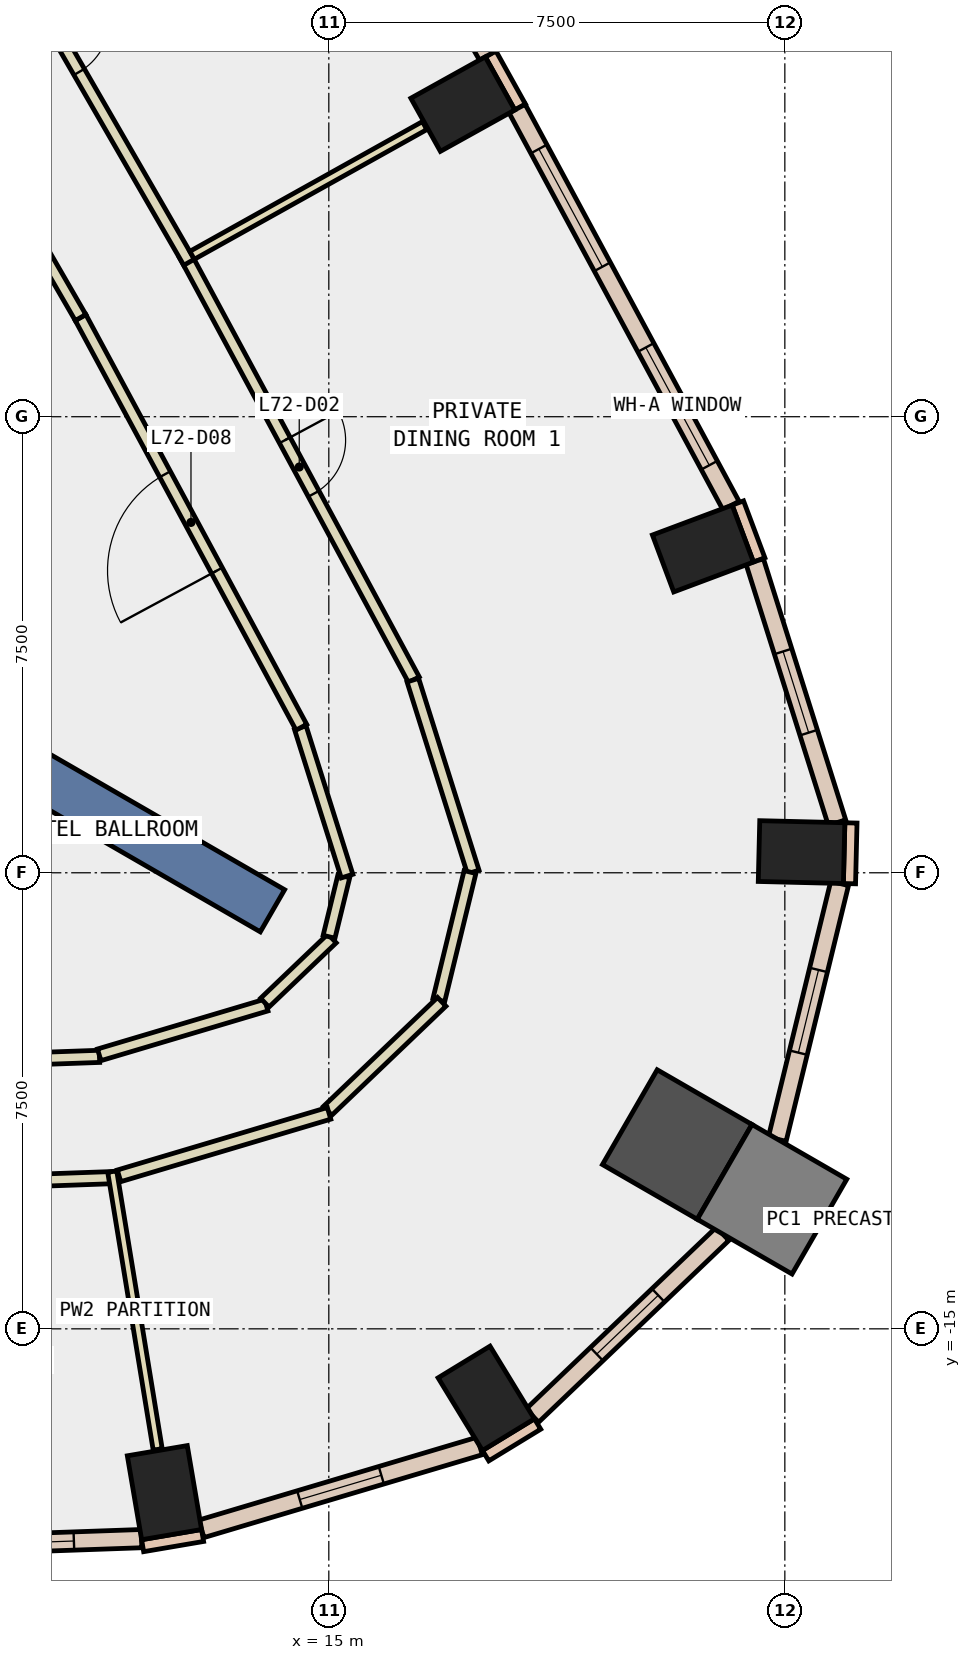
"""IFC4 building model, lengths in metres.
Left out: names, types, materials, properties, quantities, classifications, styles, units other than length and angle.
Written with IfcOpenShell. Run it as: python <this file> out.ifc"""

import sys

from ifc_helpers import new_model, si_unit, direction, frame, frame_2d, origin, origin_2d, place, context, subcontext, project, spatial, rectangle, extrude, element, fill, save


model = new_model("IFC4")
c1 = context("Model", 3, precision=1e-05, world=origin(), true_north=direction((0.0, 1.0)))
c2 = subcontext(c1, "Body", "Model", "MODEL_VIEW")
j1 = project(units=[si_unit("LENGTHUNIT", "METRE"), si_unit("PLANEANGLEUNIT", "RADIAN")], contexts=[c1])
p1 = place(None, origin())
s1 = spatial("IfcSite", under=j1, at=p1, CompositionType="ELEMENT")
p2 = place(p1, origin())
s2 = spatial("IfcBuilding", under=s1, at=p2, CompositionType="ELEMENT")
p3 = place(p2, frame((0.0, 0.0, 308.0)))
s3 = spatial("IfcBuildingStorey", under=s2, at=p3, CompositionType="ELEMENT", Elevation=308.0)
for number, where, z_axis, x_axis in (
    (1, (12.297, -17.694, -0.34), (0.0, 0.0, 1.0), (0.986, 0.168, 0.0)),
    (2, (17.589, -16.143, -0.34), (0.0, 0.0, 1.0), (0.854, 0.521, 0.0)),
):
    element("IfcColumn", number, at=place(p3, frame(where, z_axis=z_axis, x_axis=x_axis)), inside=s3, PredefinedType="COLUMN", context=c2, shape_type="SweptSolid", body=[
        extrude(rectangle(XDim=1.0, YDim=1.4, at=origin_2d()), origin(), (0.0, 0.0, 1.0), 3.6),
    ])
p4 = place(p3, frame((20.73, -11.969, -0.34), z_axis=(0.0, 0.0, 1.0), x_axis=(-0.866025403784, 0.5, 0.0)))
e3 = element("IfcColumn", 3, at=p4, inside=s3, PredefinedType="COLUMN", context=c2, shape_type="SweptSolid", body=[
    extrude(rectangle(XDim=1.8, YDim=1.8, at=origin_2d()), origin(), (0.0, 0.0, 1.0), 3.6),
])
for number, where, z_axis, x_axis in (
    (4, (22.775, -7.16, -0.34), (0.0, 0.0, 1.0), (0.024, 1.0, 0.0)),
    (5, (21.153, -2.168, -0.34), (0.0, 0.0, 1.0), (-0.351, 0.936, 0.0)),
    (6, (17.204, 5.141, -0.34), (0.0, 0.0, 1.0), (-0.486, 0.874, 0.0)),
):
    element("IfcColumn", number, at=place(p3, frame(where, z_axis=z_axis, x_axis=x_axis)), inside=s3, PredefinedType="COLUMN", context=c2, shape_type="SweptSolid", body=[
        extrude(rectangle(XDim=1.0, YDim=1.4, at=origin_2d()), origin(), (0.0, 0.0, 1.0), 3.6),
    ])
p5 = place(p3, frame((22.289, -12.869, -0.34), z_axis=(0.0, 0.0, 1.0), x_axis=(-0.866025403784, 0.5, 0.0)))
e7 = element("IfcColumn", 7, at=p5, inside=s3, PredefinedType="COLUMN", context=c2, shape_type="SweptSolid", body=[
    extrude(rectangle(XDim=1.8, YDim=1.8, at=origin_2d()), origin(), (0.0, 0.0, 1.0), 3.6),
])
p6 = place(p3, frame((6.279, -3.625, -0.34), z_axis=(0.0, 0.0, 1.0), x_axis=(0.866017533419, -0.500013631625, 0.0)))
e8 = element("IfcWall", 8, at=p6, inside=s3, PredefinedType="SHEAR", context=c2, shape_type="SweptSolid", body=[
    extrude(rectangle(XDim=9.0, YDim=0.8, at=frame_2d((4.5, 0.0))), origin(), (0.0, 0.0, 1.0), 3.6),
])
p7 = place(p3, frame((22.078, -2.355, 0.0), z_axis=(0.0, 0.0, 1.0), x_axis=(-0.350962844851, 0.936389385637, 0.0)))
e9 = element("IfcWall", 9, at=p7, inside=s3, PredefinedType="STANDARD", context=c2, shape_type="SweptSolid", body=[
    extrude(rectangle(XDim=1.0, YDim=0.2, at=frame_2d((0.5, 0.0))), origin(), (0.0, 0.0, 1.0), 3.26),
])
p8 = place(p3, frame((18.147, 5.092, 0.0), z_axis=(0.0, 0.0, 1.0), x_axis=(-0.486036693078, 0.873938403425, 0.0)))
e10 = element("IfcWall", 10, at=p8, inside=s3, PredefinedType="STANDARD", context=c2, shape_type="SweptSolid", body=[
    extrude(rectangle(XDim=1.0, YDim=0.2, at=frame_2d((0.5, 0.0))), origin(), (0.0, 0.0, 1.0), 3.26),
])
p9 = place(p3, frame((11.938, -18.566, 0.0), z_axis=(0.0, 0.0, 1.0), x_axis=(0.985800545746, 0.167920469293, 0.0)))
e11 = element("IfcWall", 11, at=p9, inside=s3, PredefinedType="STANDARD", context=c2, shape_type="SweptSolid", body=[
    extrude(rectangle(XDim=1.0, YDim=0.2, at=frame_2d((0.5, 0.0))), origin(), (0.0, 0.0, 1.0), 3.26),
])
p10 = place(p3, frame((17.579, -17.086, 0.0), z_axis=(0.0, 0.0, 1.0), x_axis=(0.853679739553, 0.520798331677, 0.0)))
e12 = element("IfcWall", 12, at=p10, inside=s3, PredefinedType="STANDARD", context=c2, shape_type="SweptSolid", body=[
    extrude(rectangle(XDim=1.0, YDim=0.2, at=frame_2d((0.5, 0.0))), origin(), (0.0, 0.0, 1.0), 3.26),
])
p11 = place(p3, frame((23.563, -7.679, 0.0), z_axis=(0.0, 0.0, 1.0), x_axis=(0.023942303888, 0.999713341956, 0.0)))
e13 = element("IfcWall", 13, at=p11, inside=s3, PredefinedType="STANDARD", context=c2, shape_type="SweptSolid", body=[
    extrude(rectangle(XDim=0.999, YDim=0.2, at=frame_2d((0.5, 0.0))), origin(), (0.0, 0.0, 1.0), 3.26),
])
p12 = place(p3, frame((8.296, -18.578, 0.0), z_axis=(0.0, 0.0, 1.0), x_axis=(0.999377185233, 0.035287981473, 0.0)))
e14 = element("IfcWall", 14, at=p12, inside=s3, PredefinedType="STANDARD", context=c2, shape_type="SweptSolid", body=[
    extrude(rectangle(XDim=3.625, YDim=0.3, at=frame_2d((1.812, 0.0))), origin(), (0.0, 0.0, 1.0), 3.26),
])
p13 = place(p12, frame((1.113, 0.0, 0.9)))
e15 = element("IfcOpeningElement", 15, at=p13, cuts=e14, PredefinedType="OPENING", context=c2, shape_type="SweptSolid", body=[
    extrude(rectangle(XDim=1.4, YDim=2.0, at=frame_2d((0.7, 1.0))), frame((0.0, 0.16, 0.0), z_axis=(0.0, -1.0, 0.0), x_axis=(1.0, 0.0, 0.0)), (0.0, 0.0, 1.0), 0.32),
])
p14 = place(p3, frame((12.904, -18.289, 0.0), z_axis=(0.0, 0.0, 1.0), x_axis=(0.95841929886, 0.285363711031, 0.0)))
e16 = element("IfcWall", 16, at=p14, inside=s3, PredefinedType="STANDARD", context=c2, shape_type="SweptSolid", body=[
    extrude(rectangle(XDim=4.777, YDim=0.3, at=frame_2d((2.388, 0.0))), origin(), (0.0, 0.0, 1.0), 3.26),
])
p15 = place(p14, frame((1.688, 0.0, 0.9)))
e17 = element("IfcOpeningElement", 17, at=p15, cuts=e16, PredefinedType="OPENING", context=c2, shape_type="SweptSolid", body=[
    extrude(rectangle(XDim=1.4, YDim=2.0, at=frame_2d((0.7, 1.0))), frame((0.0, 0.16, 0.0), z_axis=(0.0, -1.0, 0.0), x_axis=(1.0, 0.0, 0.0)), (0.0, 0.0, 1.0), 0.32),
])
p16 = place(p3, frame((18.347, -16.427, 0.0), z_axis=(0.0, 0.0, 1.0), x_axis=(0.723113419412, 0.690729312152, 0.0)))
e18 = element("IfcWall", 18, at=p16, inside=s3, PredefinedType="STANDARD", context=c2, shape_type="SweptSolid", body=[
    extrude(rectangle(XDim=4.327, YDim=0.3, at=frame_2d((2.164, 0.0))), origin(), (0.0, 0.0, 1.0), 3.26),
])
p17 = place(p16, frame((1.464, 0.0, 0.9)))
e19 = element("IfcOpeningElement", 19, at=p17, cuts=e18, PredefinedType="OPENING", context=c2, shape_type="SweptSolid", body=[
    extrude(rectangle(XDim=1.4, YDim=2.0, at=frame_2d((0.7, 1.0))), frame((0.0, 0.16, 0.0), z_axis=(0.0, -1.0, 0.0), x_axis=(1.0, 0.0, 0.0)), (0.0, 0.0, 1.0), 0.32),
])
p18 = place(p3, frame((22.375, -11.881, 0.0), z_axis=(0.0, 0.0, 1.0), x_axis=(0.236958776561, 0.971519705519, 0.0)))
e20 = element("IfcWall", 20, at=p18, inside=s3, PredefinedType="STANDARD", context=c2, shape_type="SweptSolid", body=[
    extrude(rectangle(XDim=4.329, YDim=0.3, at=frame_2d((2.165, 0.0))), origin(), (0.0, 0.0, 1.0), 3.26),
])
p19 = place(p18, frame((1.465, 0.0, 0.9)))
e21 = element("IfcOpeningElement", 21, at=p19, cuts=e20, PredefinedType="OPENING", context=c2, shape_type="SweptSolid", body=[
    extrude(rectangle(XDim=1.4, YDim=2.0, at=frame_2d((0.7, 1.0))), frame((0.0, 0.16, 0.0), z_axis=(0.0, -1.0, 0.0), x_axis=(1.0, 0.0, 0.0)), (0.0, 0.0, 1.0), 0.32),
])
p20 = place(p3, frame((23.358, -6.675, 0.0), z_axis=(0.0, 0.0, 1.0), x_axis=(-0.300534385574, 0.953770980418, 0.0)))
e22 = element("IfcWall", 22, at=p20, inside=s3, PredefinedType="STANDARD", context=c2, shape_type="SweptSolid", body=[
    extrude(rectangle(XDim=4.502, YDim=0.3, at=frame_2d((2.251, 0.0))), origin(), (0.0, 0.0, 1.0), 3.26),
])
p21 = place(p20, frame((1.551, 0.0, 0.9)))
e23 = element("IfcOpeningElement", 23, at=p21, cuts=e22, PredefinedType="OPENING", context=c2, shape_type="SweptSolid", body=[
    extrude(rectangle(XDim=1.4, YDim=2.0, at=frame_2d((0.7, 1.0))), frame((0.0, 0.16, 0.0), z_axis=(0.0, -1.0, 0.0), x_axis=(1.0, 0.0, 0.0)), (0.0, 0.0, 1.0), 0.32),
])
p22 = place(p3, frame((21.615, -1.462, 0.0), z_axis=(0.0, 0.0, 1.0), x_axis=(-0.474421773145, 0.880297666228, 0.0)))
e24 = element("IfcWall", 24, at=p22, inside=s3, PredefinedType="STANDARD", context=c2, shape_type="SweptSolid", body=[
    extrude(rectangle(XDim=7.416, YDim=0.3, at=frame_2d((3.708, 0.0))), origin(), (0.0, 0.0, 1.0), 3.26),
])
p23 = place(p22, frame((0.754, 0.0, 0.9)))
e25 = element("IfcOpeningElement", 25, at=p23, cuts=e24, PredefinedType="OPENING", context=c2, shape_type="SweptSolid", body=[
    extrude(rectangle(XDim=2.2, YDim=2.0, at=frame_2d((1.1, 1.0))), frame((0.0, 0.16, 0.0), z_axis=(0.0, -1.0, 0.0), x_axis=(1.0, 0.0, 0.0)), (0.0, 0.0, 1.0), 0.32),
])
p24 = place(p22, frame((4.462, 0.0, 0.9)))
e26 = element("IfcOpeningElement", 26, at=p24, cuts=e24, PredefinedType="OPENING", context=c2, shape_type="SweptSolid", body=[
    extrude(rectangle(XDim=2.2, YDim=2.0, at=frame_2d((1.1, 1.0))), frame((0.0, 0.16, 0.0), z_axis=(0.0, -1.0, 0.0), x_axis=(1.0, 0.0, 0.0)), (0.0, 0.0, 1.0), 0.32),
])
p25 = place(p3, frame((17.61, 5.937, 0.0), z_axis=(0.0, 0.0, 1.0), x_axis=(-0.499923391538, 0.866069629183, 0.0)))
e27 = element("IfcWall", 27, at=p25, inside=s3, PredefinedType="STANDARD", context=c2, shape_type="SweptSolid", body=[
    extrude(rectangle(XDim=7.327, YDim=0.3, at=frame_2d((3.664, 0.0))), origin(), (0.0, 0.0, 1.0), 3.26),
])
p26 = place(p25, frame((0.732, 0.0, 0.9)))
e28 = element("IfcOpeningElement", 28, at=p26, cuts=e27, PredefinedType="OPENING", context=c2, shape_type="SweptSolid", body=[
    extrude(rectangle(XDim=2.2, YDim=2.0, at=frame_2d((1.1, 1.0))), frame((0.0, 0.16, 0.0), z_axis=(0.0, -1.0, 0.0), x_axis=(1.0, 0.0, 0.0)), (0.0, 0.0, 1.0), 0.32),
])
p27 = place(p25, frame((4.395, 0.0, 0.9)))
e29 = element("IfcOpeningElement", 29, at=p27, cuts=e27, PredefinedType="OPENING", context=c2, shape_type="SweptSolid", body=[
    extrude(rectangle(XDim=2.2, YDim=2.0, at=frame_2d((1.1, 1.0))), frame((0.0, 0.16, 0.0), z_axis=(0.0, -1.0, 0.0), x_axis=(1.0, 0.0, 0.0)), (0.0, 0.0, 1.0), 0.32),
])
p28 = place(p3, frame((7.9, -10.637, 0.0), z_axis=(0.0, 0.0, 1.0), x_axis=(0.999372900517, 0.035409119054, 0.0)))
e30 = element("IfcWall", 30, at=p28, inside=s3, PredefinedType="PARTITIONING", context=c2, shape_type="SweptSolid", body=[
    extrude(rectangle(XDim=3.33, YDim=0.2, at=frame_2d((1.665, 0.0))), origin(), (0.0, 0.0, 1.0), 3.26),
])
p29 = place(p3, frame((11.224, -10.494, 0.0), z_axis=(0.0, 0.0, 1.0), x_axis=(0.958417413979, 0.285370041492, 0.0)))
e31 = element("IfcWall", 31, at=p29, inside=s3, PredefinedType="PARTITIONING", context=c2, shape_type="SweptSolid", body=[
    extrude(rectangle(XDim=2.866, YDim=0.2, at=frame_2d((1.433, 0.0))), origin(), (0.0, 0.0, 1.0), 3.26),
])
p30 = place(p3, frame((13.947, -9.636, 0.0), z_axis=(0.0, 0.0, 1.0), x_axis=(0.723283043556, 0.690551691696, 0.0)))
e32 = element("IfcWall", 32, at=p30, inside=s3, PredefinedType="PARTITIONING", context=c2, shape_type="SweptSolid", body=[
    extrude(rectangle(XDim=1.529, YDim=0.2, at=frame_2d((0.765, 0.0))), origin(), (0.0, 0.0, 1.0), 3.26),
])
p31 = place(p3, frame((15.004, -8.552, 0.0), z_axis=(0.0, 0.0, 1.0), x_axis=(0.237373129266, 0.971418549083, 0.0)))
e33 = element("IfcWall", 33, at=p31, inside=s3, PredefinedType="PARTITIONING", context=c2, shape_type="SweptSolid", body=[
    extrude(rectangle(XDim=1.024, YDim=0.2, at=frame_2d((0.512, 0.0))), origin(), (0.0, 0.0, 1.0), 3.26),
])
p32 = place(p3, frame((15.3, -7.555, 0.0), z_axis=(0.0, 0.0, 1.0), x_axis=(-0.300501248013, 0.953781421471, 0.0)))
e34 = element("IfcWall", 34, at=p32, inside=s3, PredefinedType="PARTITIONING", context=c2, shape_type="SweptSolid", body=[
    extrude(rectangle(XDim=2.559, YDim=0.2, at=frame_2d((1.28, 0.0))), origin(), (0.0, 0.0, 1.0), 3.26),
])
p33 = place(p3, frame((14.549, -5.107, 0.0), z_axis=(0.0, 0.0, 1.0), x_axis=(-0.47449538478, 0.880257990491, 0.0)))
e35 = element("IfcWall", 35, at=p33, inside=s3, PredefinedType="PARTITIONING", context=c2, shape_type="SweptSolid", body=[
    extrude(rectangle(XDim=7.655, YDim=0.2, at=frame_2d((3.827, 0.0))), origin(), (0.0, 0.0, 1.0), 3.26),
])
p34 = place(p33, frame((2.927, 0.0, 0.0)))
e36 = element("IfcOpeningElement", 36, at=p34, cuts=e35, PredefinedType="OPENING", context=c2, shape_type="SweptSolid", body=[
    extrude(rectangle(XDim=1.8, YDim=2.1, at=frame_2d((0.9, 1.05))), frame((0.0, 0.11, 0.0), z_axis=(0.0, -1.0, 0.0), x_axis=(1.0, 0.0, 0.0)), (0.0, 0.0, 1.0), 0.22),
])
p35 = place(p3, frame((10.917, 1.631, 0.0), z_axis=(0.0, 0.0, 1.0), x_axis=(-0.500699613169, 0.865621104972, 0.0)))
e37 = element("IfcWall", 37, at=p35, inside=s3, PredefinedType="PARTITIONING", context=c2, shape_type="SweptSolid", body=[
    extrude(rectangle(XDim=1.715, YDim=0.2, at=frame_2d((0.858, 0.0))), origin(), (0.0, 0.0, 1.0), 3.26),
])
p36 = place(p3, frame((11.479, -12.512, 0.0), z_axis=(0.0, 0.0, 1.0), x_axis=(-0.999371508837, -0.035448375484, 0.0)))
e38 = element("IfcWall", 38, at=p36, inside=s3, PredefinedType="PARTITIONING", context=c2, shape_type="SweptSolid", body=[
    extrude(rectangle(XDim=3.581, YDim=0.2, at=frame_2d((1.791, 0.0))), origin(), (0.0, 0.0, 1.0), 3.26),
])
p37 = place(p3, frame((12.628, 2.671, 0.0), z_axis=(0.0, 0.0, 1.0), x_axis=(0.474489967676, -0.880260910512, 0.0)))
e39 = element("IfcWall", 39, at=p37, inside=s3, PredefinedType="PARTITIONING", context=c2, shape_type="SweptSolid", body=[
    extrude(rectangle(XDim=7.948, YDim=0.2, at=frame_2d((3.974, 0.0))), origin(), (0.0, 0.0, 1.0), 3.26),
])
p38 = place(p37, frame((3.474, 0.0, 0.0)))
e40 = element("IfcOpeningElement", 40, at=p38, cuts=e39, PredefinedType="OPENING", context=c2, shape_type="SweptSolid", body=[
    extrude(rectangle(XDim=1.0, YDim=2.1, at=frame_2d((0.5, 1.05))), frame((0.0, 0.11, 0.0), z_axis=(0.0, -1.0, 0.0), x_axis=(1.0, 0.0, 0.0)), (0.0, 0.0, 1.0), 0.22),
])
p39 = place(p3, frame((16.382, -4.332, 0.0), z_axis=(0.0, 0.0, 1.0), x_axis=(0.300195088058, -0.953877827138, 0.0)))
e41 = element("IfcWall", 41, at=p39, inside=s3, PredefinedType="PARTITIONING", context=c2, shape_type="SweptSolid", body=[
    extrude(rectangle(XDim=3.308, YDim=0.2, at=frame_2d((1.654, 0.0))), origin(), (0.0, 0.0, 1.0), 3.26),
])
p40 = place(p3, frame((17.322, -7.488, 0.0), z_axis=(0.0, 0.0, 1.0), x_axis=(-0.23664760587, -0.971595548897, 0.0)))
e42 = element("IfcWall", 42, at=p40, inside=s3, PredefinedType="PARTITIONING", context=c2, shape_type="SweptSolid", body=[
    extrude(rectangle(XDim=2.167, YDim=0.2, at=frame_2d((1.084, 0.0))), origin(), (0.0, 0.0, 1.0), 3.26),
])
p41 = place(p3, frame((16.857, -9.622, 0.0), z_axis=(0.0, 0.0, 1.0), x_axis=(-0.723099256445, -0.690744138831, 0.0)))
e43 = element("IfcWall", 43, at=p41, inside=s3, PredefinedType="PARTITIONING", context=c2, shape_type="SweptSolid", body=[
    extrude(rectangle(XDim=2.596, YDim=0.2, at=frame_2d((1.298, 0.0))), origin(), (0.0, 0.0, 1.0), 3.26),
])
p42 = place(p3, frame((15.004, -11.456, 0.0), z_axis=(0.0, 0.0, 1.0), x_axis=(-0.958459796003, -0.285227662485, 0.0)))
e44 = element("IfcWall", 44, at=p42, inside=s3, PredefinedType="PARTITIONING", context=c2, shape_type="SweptSolid", body=[
    extrude(rectangle(XDim=3.604, YDim=0.2, at=frame_2d((1.802, 0.0))), origin(), (0.0, 0.0, 1.0), 3.26),
])
p43 = place(p3, frame((8.588, 9.665, 0.0), z_axis=(0.0, 0.0, 1.0), x_axis=(0.499946799636, -0.86605611685, 0.0)))
e45 = element("IfcWall", 45, at=p43, inside=s3, PredefinedType="PARTITIONING", context=c2, shape_type="SweptSolid", body=[
    extrude(rectangle(XDim=8.227, YDim=0.2, at=frame_2d((4.114, 0.0))), origin(), (0.0, 0.0, 1.0), 3.26),
])
p44 = place(p43, frame((3.613, 0.0, 0.0)))
e46 = element("IfcOpeningElement", 46, at=p44, cuts=e45, PredefinedType="OPENING", context=c2, shape_type="SweptSolid", body=[
    extrude(rectangle(XDim=1.0, YDim=2.1, at=frame_2d((0.5, 1.05))), frame((0.0, 0.11, 0.0), z_axis=(0.0, -1.0, 0.0), x_axis=(1.0, 0.0, 0.0)), (0.0, 0.0, 1.0), 0.22),
])
p45 = place(p3, frame((11.438, -12.414, 0.0), z_axis=(0.0, 0.0, 1.0), x_axis=(0.161576343941, -0.986860215572, 0.0)))
e47 = element("IfcWall", 47, at=p45, inside=s3, PredefinedType="PARTITIONING", context=c2, shape_type="SweptSolid", body=[
    extrude(rectangle(XDim=4.63, YDim=0.15, at=frame_2d((2.315, 0.0))), origin(), (0.0, 0.0, 1.0), 3.26),
])
p46 = place(p3, frame((12.751, 2.654, 0.0), z_axis=(0.0, 0.0, 1.0), x_axis=(0.873277679945, 0.487222837837, 0.0)))
e48 = element("IfcWall", 48, at=p46, inside=s3, PredefinedType="PARTITIONING", context=c2, shape_type="SweptSolid", body=[
    extrude(rectangle(XDim=4.38, YDim=0.15, at=frame_2d((2.19, 0.0))), origin(), (0.0, 0.0, 1.0), 3.26),
])
p47 = place(p13, origin())
e49 = element("IfcWindow", 49, at=p47, inside=s3, PartitioningType="SINGLE_PANEL", PredefinedType="WINDOW", context=c2, shape_type="SweptSolid", body=[
    extrude(rectangle(XDim=1.4, YDim=2.0, at=frame_2d((0.7, 1.0))), frame((0.0, 0.03, 0.0), z_axis=(0.0, -1.0, 0.0), x_axis=(1.0, 0.0, 0.0)), (0.0, 0.0, 1.0), 0.06),
])
fill(e15, e49)
p48 = place(p15, origin())
e50 = element("IfcWindow", 50, at=p48, inside=s3, PartitioningType="SINGLE_PANEL", PredefinedType="WINDOW", context=c2, shape_type="SweptSolid", body=[
    extrude(rectangle(XDim=1.4, YDim=2.0, at=frame_2d((0.7, 1.0))), frame((0.0, 0.03, 0.0), z_axis=(0.0, -1.0, 0.0), x_axis=(1.0, 0.0, 0.0)), (0.0, 0.0, 1.0), 0.06),
])
fill(e17, e50)
p49 = place(p17, origin())
e51 = element("IfcWindow", 51, at=p49, inside=s3, PartitioningType="SINGLE_PANEL", PredefinedType="WINDOW", context=c2, shape_type="SweptSolid", body=[
    extrude(rectangle(XDim=1.4, YDim=2.0, at=frame_2d((0.7, 1.0))), frame((0.0, 0.03, 0.0), z_axis=(0.0, -1.0, 0.0), x_axis=(1.0, 0.0, 0.0)), (0.0, 0.0, 1.0), 0.06),
])
fill(e19, e51)
p50 = place(p19, origin())
e52 = element("IfcWindow", 52, at=p50, inside=s3, PartitioningType="SINGLE_PANEL", PredefinedType="WINDOW", context=c2, shape_type="SweptSolid", body=[
    extrude(rectangle(XDim=1.4, YDim=2.0, at=frame_2d((0.7, 1.0))), frame((0.0, 0.03, 0.0), z_axis=(0.0, -1.0, 0.0), x_axis=(1.0, 0.0, 0.0)), (0.0, 0.0, 1.0), 0.06),
])
fill(e21, e52)
p51 = place(p21, origin())
e53 = element("IfcWindow", 53, at=p51, inside=s3, PartitioningType="SINGLE_PANEL", PredefinedType="WINDOW", context=c2, shape_type="SweptSolid", body=[
    extrude(rectangle(XDim=1.4, YDim=2.0, at=frame_2d((0.7, 1.0))), frame((0.0, 0.03, 0.0), z_axis=(0.0, -1.0, 0.0), x_axis=(1.0, 0.0, 0.0)), (0.0, 0.0, 1.0), 0.06),
])
fill(e23, e53)
p52 = place(p23, origin())
e54 = element("IfcWindow", 54, at=p52, inside=s3, PartitioningType="SINGLE_PANEL", PredefinedType="WINDOW", context=c2, shape_type="SweptSolid", body=[
    extrude(rectangle(XDim=2.2, YDim=2.0, at=frame_2d((1.1, 1.0))), frame((0.0, 0.03, 0.0), z_axis=(0.0, -1.0, 0.0), x_axis=(1.0, 0.0, 0.0)), (0.0, 0.0, 1.0), 0.06),
])
fill(e25, e54)
p53 = place(p24, origin())
e55 = element("IfcWindow", 55, at=p53, inside=s3, PartitioningType="SINGLE_PANEL", PredefinedType="WINDOW", context=c2, shape_type="SweptSolid", body=[
    extrude(rectangle(XDim=2.2, YDim=2.0, at=frame_2d((1.1, 1.0))), frame((0.0, 0.03, 0.0), z_axis=(0.0, -1.0, 0.0), x_axis=(1.0, 0.0, 0.0)), (0.0, 0.0, 1.0), 0.06),
])
fill(e26, e55)
p54 = place(p38, origin())
e56 = element("IfcDoor", 56, at=p54, inside=s3, OperationType="SINGLE_SWING_LEFT", PredefinedType="DOOR", context=c2, shape_type="SweptSolid", body=[
    extrude(rectangle(XDim=1.0, YDim=2.1, at=frame_2d((0.5, 1.05))), frame((0.0, 0.025, 0.0), z_axis=(0.0, -1.0, 0.0), x_axis=(1.0, 0.0, 0.0)), (0.0, 0.0, 1.0), 0.05),
])
fill(e40, e56)
p55 = place(p44, origin())
e57 = element("IfcDoor", 57, at=p55, inside=s3, OperationType="SINGLE_SWING_RIGHT", PredefinedType="DOOR", context=c2, shape_type="SweptSolid", body=[
    extrude(rectangle(XDim=1.0, YDim=2.1, at=frame_2d((0.5, 1.05))), frame((0.0, 0.025, 0.0), z_axis=(0.0, -1.0, 0.0), x_axis=(1.0, 0.0, 0.0)), (0.0, 0.0, 1.0), 0.05),
])
fill(e46, e57)
p56 = place(p34, origin())
e58 = element("IfcDoor", 58, at=p56, inside=s3, OperationType="DOUBLE_DOOR_SINGLE_SWING", PredefinedType="DOOR", context=c2, shape_type="SweptSolid", body=[
    extrude(rectangle(XDim=1.8, YDim=2.1, at=frame_2d((0.9, 1.05))), frame((0.0, 0.025, 0.0), z_axis=(0.0, -1.0, 0.0), x_axis=(1.0, 0.0, 0.0)), (0.0, 0.0, 1.0), 0.05),
])
fill(e36, e58)
save(model, sys.argv[1])
